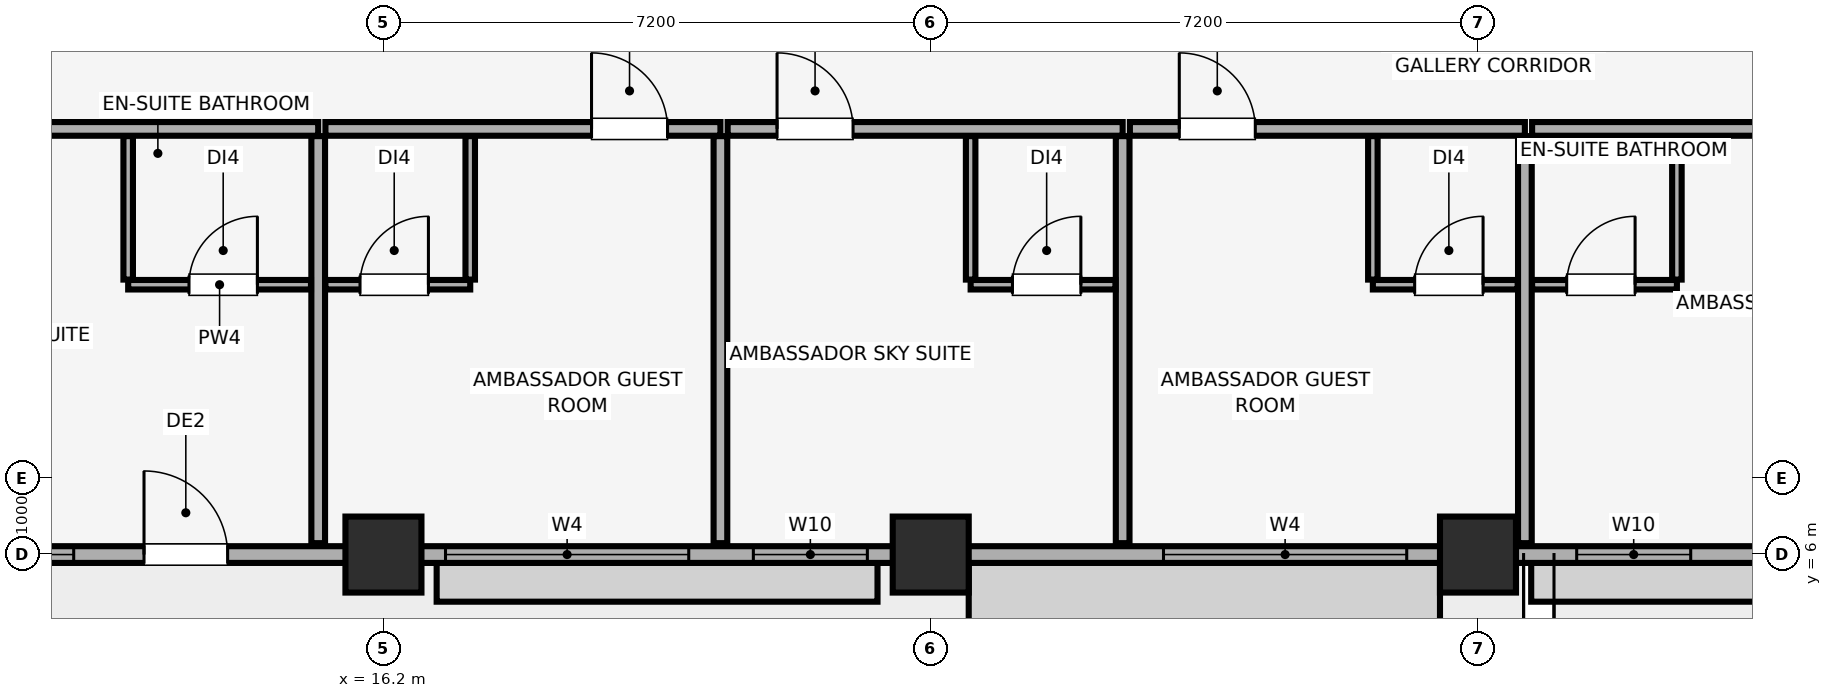
"""IFC4 building model, lengths in metres.
Left out: names, types, materials, properties, quantities, classifications, styles, units other than length and angle.
Written with IfcOpenShell. Run it as: python <this file> out.ifc"""

import sys

from ifc_helpers import new_model, si_unit, direction, frame, frame_2d, origin, origin_2d, place, context, subcontext, project, spatial, rectangle, extrude, element, fill, save


model = new_model("IFC4")
c1 = context("Model", 3, precision=1e-05, world=origin(), true_north=direction((0.0, 1.0)))
c2 = subcontext(c1, "Body", "Model", "MODEL_VIEW")
j1 = project(units=[si_unit("LENGTHUNIT", "METRE"), si_unit("PLANEANGLEUNIT", "RADIAN")], contexts=[c1])
p1 = place(None, origin())
s1 = spatial("IfcSite", under=j1, at=p1, CompositionType="ELEMENT")
p2 = place(p1, origin())
s2 = spatial("IfcBuilding", under=s1, at=p2, CompositionType="ELEMENT")
p3 = place(p2, frame((0.0, 0.0, 229.15)))
s3 = spatial("IfcBuildingStorey", under=s2, at=p3, CompositionType="ELEMENT", Elevation=229.15)
for number, where, z_axis, x_axis in (
    (1, (16.2, 6.0, 0.0), (0.0, 0.0, 1.0), (1.0, 0.0, 0.0)),
    (2, (23.4, 6.0, 0.0), (0.0, 0.0, 1.0), (1.0, 0.0, 0.0)),
    (3, (30.6, 6.0, 0.0), (0.0, 0.0, 1.0), (1.0, 0.0, 0.0)),
):
    element("IfcColumn", number, at=place(p3, frame(where, z_axis=z_axis, x_axis=x_axis)), inside=s3, PredefinedType="COLUMN", context=c2, shape_type="SweptSolid", body=[
        extrude(rectangle(XDim=1.0, YDim=1.0, at=origin_2d()), origin(), (0.0, 0.0, 1.0), 3.71),
    ])
p4 = place(p3, frame((9.8, 6.0, 0.0), z_axis=(0.0, 0.0, 1.0), x_axis=(1.0, 0.0, 0.0)))
e4 = element("IfcWall", 4, at=p4, inside=s3, PredefinedType="SOLIDWALL", context=c2, shape_type="SweptSolid", body=[
    extrude(rectangle(XDim=64.4, YDim=0.22, at=frame_2d((32.2, 0.0))), origin(), (0.0, 0.0, 1.0), 2.91),
])
p5 = place(p4, frame((3.25, 0.0, 0.0)))
e5 = element("IfcOpeningElement", 5, at=p5, cuts=e4, PredefinedType="OPENING", context=c2, shape_type="SweptSolid", body=[
    extrude(rectangle(XDim=1.1, YDim=2.15, at=frame_2d((0.55, 1.075))), frame((0.0, 0.12, 0.0), z_axis=(0.0, -1.0, 0.0), x_axis=(1.0, 0.0, 0.0)), (0.0, 0.0, 1.0), 0.24),
])
p6 = place(p4, frame((24.45, 0.0, 0.0)))
e6 = element("IfcOpeningElement", 6, at=p6, cuts=e4, PredefinedType="OPENING", context=c2, shape_type="SweptSolid", body=[
    extrude(rectangle(XDim=1.1, YDim=2.15, at=frame_2d((0.55, 1.075))), frame((0.0, 0.12, 0.0), z_axis=(0.0, -1.0, 0.0), x_axis=(1.0, 0.0, 0.0)), (0.0, 0.0, 1.0), 0.24),
])
p7 = place(p4, frame((45.65, 0.0, 0.0)))
e7 = element("IfcOpeningElement", 7, at=p7, cuts=e4, PredefinedType="OPENING", context=c2, shape_type="SweptSolid", body=[
    extrude(rectangle(XDim=1.1, YDim=2.15, at=frame_2d((0.55, 1.075))), frame((0.0, 0.12, 0.0), z_axis=(0.0, -1.0, 0.0), x_axis=(1.0, 0.0, 0.0)), (0.0, 0.0, 1.0), 0.24),
])
p8 = place(p4, frame((0.825, 0.0, 0.85)))
e8 = element("IfcOpeningElement", 8, at=p8, cuts=e4, PredefinedType="OPENING", context=c2, shape_type="SweptSolid", body=[
    extrude(rectangle(XDim=1.5, YDim=1.4, at=frame_2d((0.75, 0.7))), frame((0.0, 0.12, 0.0), z_axis=(0.0, -1.0, 0.0), x_axis=(1.0, 0.0, 0.0)), (0.0, 0.0, 1.0), 0.24),
])
p9 = place(p4, frame((7.217, 0.0, 0.85)))
e9 = element("IfcOpeningElement", 9, at=p9, cuts=e4, PredefinedType="OPENING", context=c2, shape_type="SweptSolid", body=[
    extrude(rectangle(XDim=3.2, YDim=1.85, at=frame_2d((1.6, 0.925))), frame((0.0, 0.12, 0.0), z_axis=(0.0, -1.0, 0.0), x_axis=(1.0, 0.0, 0.0)), (0.0, 0.0, 1.0), 0.24),
])
p10 = place(p4, frame((11.267, 0.0, 0.85)))
e10 = element("IfcOpeningElement", 10, at=p10, cuts=e4, PredefinedType="OPENING", context=c2, shape_type="SweptSolid", body=[
    extrude(rectangle(XDim=1.5, YDim=1.4, at=frame_2d((0.75, 0.7))), frame((0.0, 0.12, 0.0), z_axis=(0.0, -1.0, 0.0), x_axis=(1.0, 0.0, 0.0)), (0.0, 0.0, 1.0), 0.24),
])
p11 = place(p4, frame((16.663, 0.0, 0.85)))
e11 = element("IfcOpeningElement", 11, at=p11, cuts=e4, PredefinedType="OPENING", context=c2, shape_type="SweptSolid", body=[
    extrude(rectangle(XDim=3.2, YDim=1.85, at=frame_2d((1.6, 0.925))), frame((0.0, 0.12, 0.0), z_axis=(0.0, -1.0, 0.0), x_axis=(1.0, 0.0, 0.0)), (0.0, 0.0, 1.0), 0.24),
])
p12 = place(p4, frame((22.098, 0.0, 0.85)))
e12 = element("IfcOpeningElement", 12, at=p12, cuts=e4, PredefinedType="OPENING", context=c2, shape_type="SweptSolid", body=[
    extrude(rectangle(XDim=1.5, YDim=1.4, at=frame_2d((0.75, 0.7))), frame((0.0, 0.12, 0.0), z_axis=(0.0, -1.0, 0.0), x_axis=(1.0, 0.0, 0.0)), (0.0, 0.0, 1.0), 0.24),
])
p13 = place(p4, frame((29.0, 0.0, 0.85)))
e13 = element("IfcOpeningElement", 13, at=p13, cuts=e4, PredefinedType="OPENING", context=c2, shape_type="SweptSolid", body=[
    extrude(rectangle(XDim=2.4, YDim=1.5, at=frame_2d((1.2, 0.75))), frame((0.0, 0.12, 0.0), z_axis=(0.0, -1.0, 0.0), x_axis=(1.0, 0.0, 0.0)), (0.0, 0.0, 1.0), 0.24),
])
p14 = place(p4, frame((32.4, 0.0, 0.85)))
e14 = element("IfcOpeningElement", 14, at=p14, cuts=e4, PredefinedType="OPENING", context=c2, shape_type="SweptSolid", body=[
    extrude(rectangle(XDim=3.2, YDim=1.85, at=frame_2d((1.6, 0.925))), frame((0.0, 0.12, 0.0), z_axis=(0.0, -1.0, 0.0), x_axis=(1.0, 0.0, 0.0)), (0.0, 0.0, 1.0), 0.24),
])
p15 = place(p4, frame((38.138, 0.0, 0.85)))
e15 = element("IfcOpeningElement", 15, at=p15, cuts=e4, PredefinedType="OPENING", context=c2, shape_type="SweptSolid", body=[
    extrude(rectangle(XDim=3.6, YDim=1.75, at=frame_2d((1.8, 0.875))), frame((0.0, 0.12, 0.0), z_axis=(0.0, -1.0, 0.0), x_axis=(1.0, 0.0, 0.0)), (0.0, 0.0, 1.0), 0.24),
])
p16 = place(p4, frame((48.387, 0.0, 0.85)))
e16 = element("IfcOpeningElement", 16, at=p16, cuts=e4, PredefinedType="OPENING", context=c2, shape_type="SweptSolid", body=[
    extrude(rectangle(XDim=1.5, YDim=1.4, at=frame_2d((0.75, 0.7))), frame((0.0, 0.12, 0.0), z_axis=(0.0, -1.0, 0.0), x_axis=(1.0, 0.0, 0.0)), (0.0, 0.0, 1.0), 0.24),
])
p17 = place(p4, frame((53.583, 0.0, 0.85)))
e17 = element("IfcOpeningElement", 17, at=p17, cuts=e4, PredefinedType="OPENING", context=c2, shape_type="SweptSolid", body=[
    extrude(rectangle(XDim=3.6, YDim=1.75, at=frame_2d((1.8, 0.875))), frame((0.0, 0.12, 0.0), z_axis=(0.0, -1.0, 0.0), x_axis=(1.0, 0.0, 0.0)), (0.0, 0.0, 1.0), 0.24),
])
p18 = place(p4, frame((59.695, 0.0, 0.85)))
e18 = element("IfcOpeningElement", 18, at=p18, cuts=e4, PredefinedType="OPENING", context=c2, shape_type="SweptSolid", body=[
    extrude(rectangle(XDim=3.6, YDim=1.75, at=frame_2d((1.8, 0.875))), frame((0.0, 0.12, 0.0), z_axis=(0.0, -1.0, 0.0), x_axis=(1.0, 0.0, 0.0)), (0.0, 0.0, 1.0), 0.24),
])
p19 = place(p3, frame((6.15, 11.6, 0.0), z_axis=(0.0, 0.0, 1.0), x_axis=(1.0, 0.0, 0.0)))
e19 = element("IfcWall", 19, at=p19, inside=s3, PredefinedType="PARTITIONING", context=c2, shape_type="SweptSolid", body=[
    extrude(rectangle(XDim=9.192, YDim=0.18, at=frame_2d((4.596, 0.0))), origin(), (0.0, 0.0, 1.0), 3.71),
])
p20 = place(p19, frame((4.55, 0.0, 0.0)))
e20 = element("IfcOpeningElement", 20, at=p20, cuts=e19, PredefinedType="OPENING", context=c2, shape_type="SweptSolid", body=[
    extrude(rectangle(XDim=1.0, YDim=2.15, at=frame_2d((0.5, 1.075))), frame((0.0, 0.1, 0.0), z_axis=(0.0, -1.0, 0.0), x_axis=(1.0, 0.0, 0.0)), (0.0, 0.0, 1.0), 0.2),
])
p21 = place(p3, frame((15.342, 6.15, 0.0), z_axis=(0.0, 0.0, 1.0), x_axis=(0.0, 1.0, 0.0)))
e21 = element("IfcWall", 21, at=p21, inside=s3, PredefinedType="PARTITIONING", context=c2, shape_type="SweptSolid", body=[
    extrude(rectangle(XDim=5.355, YDim=0.18, at=frame_2d((2.677, 0.0))), origin(), (0.0, 0.0, 1.0), 3.08),
])
p22 = place(p3, frame((12.842, 9.55, 0.0), z_axis=(0.0, 0.0, 1.0), x_axis=(1.0, 0.0, 0.0)))
e22 = element("IfcWall", 22, at=p22, inside=s3, PredefinedType="PARTITIONING", context=c2, shape_type="SweptSolid", body=[
    extrude(rectangle(XDim=2.405, YDim=0.125, at=frame_2d((1.202, 0.0))), origin(), (0.0, 0.0, 1.0), 3.71),
])
p23 = place(p22, frame((0.8, 0.0, 0.0)))
e23 = element("IfcOpeningElement", 23, at=p23, cuts=e22, PredefinedType="OPENING", context=c2, shape_type="SweptSolid", body=[
    extrude(rectangle(XDim=0.9, YDim=2.1, at=frame_2d((0.45, 1.05))), frame((0.0, 0.073, 0.0), z_axis=(0.0, -1.0, 0.0), x_axis=(1.0, 0.0, 0.0)), (0.0, 0.0, 1.0), 0.145),
])
p24 = place(p3, frame((12.842, 9.617, 0.0), z_axis=(0.0, 0.0, 1.0), x_axis=(0.0, 1.0, 0.0)))
e24 = element("IfcWall", 24, at=p24, inside=s3, PredefinedType="PARTITIONING", context=c2, shape_type="SweptSolid", body=[
    extrude(rectangle(XDim=1.887, YDim=0.125, at=frame_2d((0.944, 0.0))), origin(), (0.0, 0.0, 1.0), 3.71),
])
p25 = place(p3, frame((15.437, 11.6, 0.0), z_axis=(0.0, 0.0, 1.0), x_axis=(1.0, 0.0, 0.0)))
e25 = element("IfcWall", 25, at=p25, inside=s3, PredefinedType="PARTITIONING", context=c2, shape_type="SweptSolid", body=[
    extrude(rectangle(XDim=5.197, YDim=0.18, at=frame_2d((2.598, 0.0))), origin(), (0.0, 0.0, 1.0), 3.71),
])
p26 = place(p25, frame((3.501, 0.0, 0.0)))
e26 = element("IfcOpeningElement", 26, at=p26, cuts=e25, PredefinedType="OPENING", context=c2, shape_type="SweptSolid", body=[
    extrude(rectangle(XDim=1.0, YDim=2.15, at=frame_2d((0.5, 1.075))), frame((0.0, 0.1, 0.0), z_axis=(0.0, -1.0, 0.0), x_axis=(1.0, 0.0, 0.0)), (0.0, 0.0, 1.0), 0.2),
])
p27 = place(p3, frame((20.633, 6.15, 0.0), z_axis=(0.0, 0.0, 1.0), x_axis=(0.0, 1.0, 0.0)))
e27 = element("IfcWall", 27, at=p27, inside=s3, PredefinedType="PARTITIONING", context=c2, shape_type="SweptSolid", body=[
    extrude(rectangle(XDim=5.355, YDim=0.18, at=frame_2d((2.677, 0.0))), origin(), (0.0, 0.0, 1.0), 3.71),
])
p28 = place(p3, frame((15.437, 9.55, 0.0), z_axis=(0.0, 0.0, 1.0), x_axis=(1.0, 0.0, 0.0)))
e28 = element("IfcWall", 28, at=p28, inside=s3, PredefinedType="PARTITIONING", context=c2, shape_type="SweptSolid", body=[
    extrude(rectangle(XDim=1.905, YDim=0.125, at=frame_2d((0.953, 0.0))), origin(), (0.0, 0.0, 1.0), 3.71),
])
p29 = place(p28, frame((0.455, 0.0, 0.0)))
e29 = element("IfcOpeningElement", 29, at=p29, cuts=e28, PredefinedType="OPENING", context=c2, shape_type="SweptSolid", body=[
    extrude(rectangle(XDim=0.9, YDim=2.1, at=frame_2d((0.45, 1.05))), frame((0.0, 0.073, 0.0), z_axis=(0.0, -1.0, 0.0), x_axis=(1.0, 0.0, 0.0)), (0.0, 0.0, 1.0), 0.145),
])
p30 = place(p3, frame((17.342, 9.617, 0.0), z_axis=(0.0, 0.0, 1.0), x_axis=(0.0, 1.0, 0.0)))
e30 = element("IfcWall", 30, at=p30, inside=s3, PredefinedType="PARTITIONING", context=c2, shape_type="SweptSolid", body=[
    extrude(rectangle(XDim=1.887, YDim=0.125, at=frame_2d((0.944, 0.0))), origin(), (0.0, 0.0, 1.0), 3.71),
])
p31 = place(p3, frame((20.729, 11.6, 0.0), z_axis=(0.0, 0.0, 1.0), x_axis=(1.0, 0.0, 0.0)))
e31 = element("IfcWall", 31, at=p31, inside=s3, PredefinedType="PARTITIONING", context=c2, shape_type="SweptSolid", body=[
    extrude(rectangle(XDim=5.197, YDim=0.18, at=frame_2d((2.598, 0.0))), origin(), (0.0, 0.0, 1.0), 3.71),
])
p32 = place(p31, frame((0.65, 0.0, 0.0)))
e32 = element("IfcOpeningElement", 32, at=p32, cuts=e31, PredefinedType="OPENING", context=c2, shape_type="SweptSolid", body=[
    extrude(rectangle(XDim=1.0, YDim=2.15, at=frame_2d((0.5, 1.075))), frame((0.0, 0.1, 0.0), z_axis=(0.0, -1.0, 0.0), x_axis=(1.0, 0.0, 0.0)), (0.0, 0.0, 1.0), 0.2),
])
p33 = place(p3, frame((25.925, 6.15, 0.0), z_axis=(0.0, 0.0, 1.0), x_axis=(0.0, 1.0, 0.0)))
e33 = element("IfcWall", 33, at=p33, inside=s3, PredefinedType="PARTITIONING", context=c2, shape_type="SweptSolid", body=[
    extrude(rectangle(XDim=5.355, YDim=0.18, at=frame_2d((2.677, 0.0))), origin(), (0.0, 0.0, 1.0), 3.71),
])
p34 = place(p3, frame((23.925, 9.55, 0.0), z_axis=(0.0, 0.0, 1.0), x_axis=(1.0, 0.0, 0.0)))
e34 = element("IfcWall", 34, at=p34, inside=s3, PredefinedType="PARTITIONING", context=c2, shape_type="SweptSolid", body=[
    extrude(rectangle(XDim=1.905, YDim=0.125, at=frame_2d((0.952, 0.0))), origin(), (0.0, 0.0, 1.0), 3.71),
])
p35 = place(p34, frame((0.55, 0.0, 0.0)))
e35 = element("IfcOpeningElement", 35, at=p35, cuts=e34, PredefinedType="OPENING", context=c2, shape_type="SweptSolid", body=[
    extrude(rectangle(XDim=0.9, YDim=2.1, at=frame_2d((0.45, 1.05))), frame((0.0, 0.073, 0.0), z_axis=(0.0, -1.0, 0.0), x_axis=(1.0, 0.0, 0.0)), (0.0, 0.0, 1.0), 0.145),
])
p36 = place(p3, frame((23.925, 9.617, 0.0), z_axis=(0.0, 0.0, 1.0), x_axis=(0.0, 1.0, 0.0)))
e36 = element("IfcWall", 36, at=p36, inside=s3, PredefinedType="PARTITIONING", context=c2, shape_type="SweptSolid", body=[
    extrude(rectangle(XDim=1.887, YDim=0.125, at=frame_2d((0.944, 0.0))), origin(), (0.0, 0.0, 1.0), 3.71),
])
p37 = place(p3, frame((26.02, 11.6, 0.0), z_axis=(0.0, 0.0, 1.0), x_axis=(1.0, 0.0, 0.0)))
e37 = element("IfcWall", 37, at=p37, inside=s3, PredefinedType="PARTITIONING", context=c2, shape_type="SweptSolid", body=[
    extrude(rectangle(XDim=5.197, YDim=0.18, at=frame_2d((2.598, 0.0))), origin(), (0.0, 0.0, 1.0), 3.71),
])
p38 = place(p37, frame((0.65, 0.0, 0.0)))
e38 = element("IfcOpeningElement", 38, at=p38, cuts=e37, PredefinedType="OPENING", context=c2, shape_type="SweptSolid", body=[
    extrude(rectangle(XDim=1.0, YDim=2.15, at=frame_2d((0.5, 1.075))), frame((0.0, 0.1, 0.0), z_axis=(0.0, -1.0, 0.0), x_axis=(1.0, 0.0, 0.0)), (0.0, 0.0, 1.0), 0.2),
])
p39 = place(p3, frame((31.217, 6.15, 0.0), z_axis=(0.0, 0.0, 1.0), x_axis=(0.0, 1.0, 0.0)))
e39 = element("IfcWall", 39, at=p39, inside=s3, PredefinedType="PARTITIONING", context=c2, shape_type="SweptSolid", body=[
    extrude(rectangle(XDim=5.355, YDim=0.18, at=frame_2d((2.677, 0.0))), origin(), (0.0, 0.0, 1.0), 3.71),
])
p40 = place(p3, frame((29.217, 9.55, 0.0), z_axis=(0.0, 0.0, 1.0), x_axis=(1.0, 0.0, 0.0)))
e40 = element("IfcWall", 40, at=p40, inside=s3, PredefinedType="PARTITIONING", context=c2, shape_type="SweptSolid", body=[
    extrude(rectangle(XDim=1.905, YDim=0.125, at=frame_2d((0.953, 0.0))), origin(), (0.0, 0.0, 1.0), 3.71),
])
p41 = place(p40, frame((0.55, 0.0, 0.0)))
e41 = element("IfcOpeningElement", 41, at=p41, cuts=e40, PredefinedType="OPENING", context=c2, shape_type="SweptSolid", body=[
    extrude(rectangle(XDim=0.9, YDim=2.1, at=frame_2d((0.45, 1.05))), frame((0.0, 0.073, 0.0), z_axis=(0.0, -1.0, 0.0), x_axis=(1.0, 0.0, 0.0)), (0.0, 0.0, 1.0), 0.145),
])
p42 = place(p3, frame((29.217, 9.617, 0.0), z_axis=(0.0, 0.0, 1.0), x_axis=(0.0, 1.0, 0.0)))
e42 = element("IfcWall", 42, at=p42, inside=s3, PredefinedType="PARTITIONING", context=c2, shape_type="SweptSolid", body=[
    extrude(rectangle(XDim=1.887, YDim=0.125, at=frame_2d((0.944, 0.0))), origin(), (0.0, 0.0, 1.0), 3.71),
])
p43 = place(p3, frame((31.312, 11.6, 0.0), z_axis=(0.0, 0.0, 1.0), x_axis=(1.0, 0.0, 0.0)))
e43 = element("IfcWall", 43, at=p43, inside=s3, PredefinedType="PARTITIONING", context=c2, shape_type="SweptSolid", body=[
    extrude(rectangle(XDim=5.197, YDim=0.18, at=frame_2d((2.598, 0.0))), origin(), (0.0, 0.0, 1.0), 3.71),
])
p44 = place(p43, frame((3.501, 0.0, 0.0)))
e44 = element("IfcOpeningElement", 44, at=p44, cuts=e43, PredefinedType="OPENING", context=c2, shape_type="SweptSolid", body=[
    extrude(rectangle(XDim=1.0, YDim=2.15, at=frame_2d((0.5, 1.075))), frame((0.0, 0.1, 0.0), z_axis=(0.0, -1.0, 0.0), x_axis=(1.0, 0.0, 0.0)), (0.0, 0.0, 1.0), 0.2),
])
p45 = place(p3, frame((31.312, 9.55, 0.0), z_axis=(0.0, 0.0, 1.0), x_axis=(1.0, 0.0, 0.0)))
e45 = element("IfcWall", 45, at=p45, inside=s3, PredefinedType="PARTITIONING", context=c2, shape_type="SweptSolid", body=[
    extrude(rectangle(XDim=1.905, YDim=0.125, at=frame_2d((0.952, 0.0))), origin(), (0.0, 0.0, 1.0), 3.71),
])
p46 = place(p45, frame((0.455, 0.0, 0.0)))
e46 = element("IfcOpeningElement", 46, at=p46, cuts=e45, PredefinedType="OPENING", context=c2, shape_type="SweptSolid", body=[
    extrude(rectangle(XDim=0.9, YDim=2.1, at=frame_2d((0.45, 1.05))), frame((0.0, 0.073, 0.0), z_axis=(0.0, -1.0, 0.0), x_axis=(1.0, 0.0, 0.0)), (0.0, 0.0, 1.0), 0.145),
])
p47 = place(p3, frame((33.217, 9.617, 0.0), z_axis=(0.0, 0.0, 1.0), x_axis=(0.0, 1.0, 0.0)))
e47 = element("IfcWall", 47, at=p47, inside=s3, PredefinedType="PARTITIONING", context=c2, shape_type="SweptSolid", body=[
    extrude(rectangle(XDim=1.887, YDim=0.125, at=frame_2d((0.944, 0.0))), origin(), (0.0, 0.0, 1.0), 3.71),
])
p48 = place(p5, origin())
e48 = element("IfcDoor", 48, at=p48, inside=s3, OperationType="SINGLE_SWING_LEFT", PredefinedType="DOOR", context=c2, shape_type="SweptSolid", body=[
    extrude(rectangle(XDim=1.1, YDim=2.15, at=frame_2d((0.55, 1.075))), frame((0.0, 0.025, 0.0), z_axis=(0.0, -1.0, 0.0), x_axis=(1.0, 0.0, 0.0)), (0.0, 0.0, 1.0), 0.05),
])
fill(e5, e48)
p49 = place(p8, origin())
e49 = element("IfcWindow", 49, at=p49, inside=s3, PartitioningType="SINGLE_PANEL", PredefinedType="WINDOW", context=c2, shape_type="SweptSolid", body=[
    extrude(rectangle(XDim=1.5, YDim=1.4, at=frame_2d((0.75, 0.7))), frame((0.0, 0.03, 0.0), z_axis=(0.0, -1.0, 0.0), x_axis=(1.0, 0.0, 0.0)), (0.0, 0.0, 1.0), 0.06),
])
fill(e8, e49)
p50 = place(p9, origin())
e50 = element("IfcWindow", 50, at=p50, inside=s3, PartitioningType="SINGLE_PANEL", PredefinedType="WINDOW", context=c2, shape_type="SweptSolid", body=[
    extrude(rectangle(XDim=3.2, YDim=1.85, at=frame_2d((1.6, 0.925))), frame((0.0, 0.03, 0.0), z_axis=(0.0, -1.0, 0.0), x_axis=(1.0, 0.0, 0.0)), (0.0, 0.0, 1.0), 0.06),
])
fill(e9, e50)
p51 = place(p10, origin())
e51 = element("IfcWindow", 51, at=p51, inside=s3, PartitioningType="SINGLE_PANEL", PredefinedType="WINDOW", context=c2, shape_type="SweptSolid", body=[
    extrude(rectangle(XDim=1.5, YDim=1.4, at=frame_2d((0.75, 0.7))), frame((0.0, 0.03, 0.0), z_axis=(0.0, -1.0, 0.0), x_axis=(1.0, 0.0, 0.0)), (0.0, 0.0, 1.0), 0.06),
])
fill(e10, e51)
p52 = place(p11, origin())
e52 = element("IfcWindow", 52, at=p52, inside=s3, PartitioningType="SINGLE_PANEL", PredefinedType="WINDOW", context=c2, shape_type="SweptSolid", body=[
    extrude(rectangle(XDim=3.2, YDim=1.85, at=frame_2d((1.6, 0.925))), frame((0.0, 0.03, 0.0), z_axis=(0.0, -1.0, 0.0), x_axis=(1.0, 0.0, 0.0)), (0.0, 0.0, 1.0), 0.06),
])
fill(e11, e52)
p53 = place(p12, origin())
e53 = element("IfcWindow", 53, at=p53, inside=s3, PartitioningType="SINGLE_PANEL", PredefinedType="WINDOW", context=c2, shape_type="SweptSolid", body=[
    extrude(rectangle(XDim=1.5, YDim=1.4, at=frame_2d((0.75, 0.7))), frame((0.0, 0.03, 0.0), z_axis=(0.0, -1.0, 0.0), x_axis=(1.0, 0.0, 0.0)), (0.0, 0.0, 1.0), 0.06),
])
fill(e12, e53)
p54 = place(p23, origin())
e54 = element("IfcDoor", 54, at=p54, inside=s3, OperationType="SINGLE_SWING_RIGHT", PredefinedType="DOOR", context=c2, shape_type="SweptSolid", body=[
    extrude(rectangle(XDim=0.9, YDim=2.1, at=frame_2d((0.45, 1.05))), frame((0.0, 0.025, 0.0), z_axis=(0.0, -1.0, 0.0), x_axis=(1.0, 0.0, 0.0)), (0.0, 0.0, 1.0), 0.05),
])
fill(e23, e54)
p55 = place(p26, origin())
e55 = element("IfcDoor", 55, at=p55, inside=s3, OperationType="SINGLE_SWING_LEFT", PredefinedType="DOOR", context=c2, shape_type="SweptSolid", body=[
    extrude(rectangle(XDim=1.0, YDim=2.15, at=frame_2d((0.5, 1.075))), frame((0.0, 0.025, 0.0), z_axis=(0.0, -1.0, 0.0), x_axis=(1.0, 0.0, 0.0)), (0.0, 0.0, 1.0), 0.05),
])
fill(e26, e55)
p56 = place(p29, origin())
e56 = element("IfcDoor", 56, at=p56, inside=s3, OperationType="SINGLE_SWING_RIGHT", PredefinedType="DOOR", context=c2, shape_type="SweptSolid", body=[
    extrude(rectangle(XDim=0.9, YDim=2.1, at=frame_2d((0.45, 1.05))), frame((0.0, 0.025, 0.0), z_axis=(0.0, -1.0, 0.0), x_axis=(1.0, 0.0, 0.0)), (0.0, 0.0, 1.0), 0.05),
])
fill(e29, e56)
p57 = place(p32, origin())
e57 = element("IfcDoor", 57, at=p57, inside=s3, OperationType="SINGLE_SWING_LEFT", PredefinedType="DOOR", context=c2, shape_type="SweptSolid", body=[
    extrude(rectangle(XDim=1.0, YDim=2.15, at=frame_2d((0.5, 1.075))), frame((0.0, 0.025, 0.0), z_axis=(0.0, -1.0, 0.0), x_axis=(1.0, 0.0, 0.0)), (0.0, 0.0, 1.0), 0.05),
])
fill(e32, e57)
p58 = place(p35, origin())
e58 = element("IfcDoor", 58, at=p58, inside=s3, OperationType="SINGLE_SWING_RIGHT", PredefinedType="DOOR", context=c2, shape_type="SweptSolid", body=[
    extrude(rectangle(XDim=0.9, YDim=2.1, at=frame_2d((0.45, 1.05))), frame((0.0, 0.025, 0.0), z_axis=(0.0, -1.0, 0.0), x_axis=(1.0, 0.0, 0.0)), (0.0, 0.0, 1.0), 0.05),
])
fill(e35, e58)
p59 = place(p38, origin())
e59 = element("IfcDoor", 59, at=p59, inside=s3, OperationType="SINGLE_SWING_LEFT", PredefinedType="DOOR", context=c2, shape_type="SweptSolid", body=[
    extrude(rectangle(XDim=1.0, YDim=2.15, at=frame_2d((0.5, 1.075))), frame((0.0, 0.025, 0.0), z_axis=(0.0, -1.0, 0.0), x_axis=(1.0, 0.0, 0.0)), (0.0, 0.0, 1.0), 0.05),
])
fill(e38, e59)
p60 = place(p41, origin())
e60 = element("IfcDoor", 60, at=p60, inside=s3, OperationType="SINGLE_SWING_RIGHT", PredefinedType="DOOR", context=c2, shape_type="SweptSolid", body=[
    extrude(rectangle(XDim=0.9, YDim=2.1, at=frame_2d((0.45, 1.05))), frame((0.0, 0.025, 0.0), z_axis=(0.0, -1.0, 0.0), x_axis=(1.0, 0.0, 0.0)), (0.0, 0.0, 1.0), 0.05),
])
fill(e41, e60)
p61 = place(p46, origin())
e61 = element("IfcDoor", 61, at=p61, inside=s3, OperationType="SINGLE_SWING_RIGHT", PredefinedType="DOOR", context=c2, shape_type="SweptSolid", body=[
    extrude(rectangle(XDim=0.9, YDim=2.1, at=frame_2d((0.45, 1.05))), frame((0.0, 0.025, 0.0), z_axis=(0.0, -1.0, 0.0), x_axis=(1.0, 0.0, 0.0)), (0.0, 0.0, 1.0), 0.05),
])
fill(e46, e61)
save(model, sys.argv[1])
